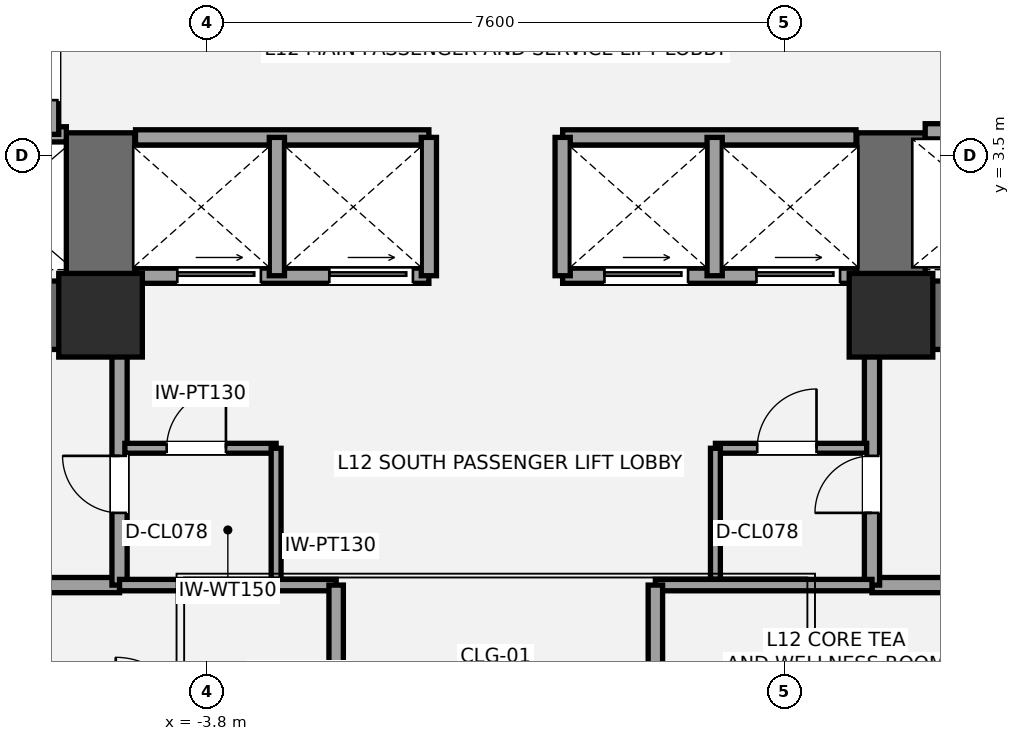
"""IFC4 building model, lengths in metres.
Left out: names, types, materials, properties, quantities, classifications, styles, units other than length and angle.
Written with IfcOpenShell. Run it as: python <this file> out.ifc"""

import sys

from ifc_helpers import new_model, si_unit, direction, frame, frame_2d, origin, origin_2d, place, context, subcontext, project, spatial, rectangle, extrude, element, fill, save


model = new_model("IFC4")
c1 = context("Model", 3, precision=1e-05, world=origin(), true_north=direction((0.0, 1.0)))
c2 = subcontext(c1, "Body", "Model", "MODEL_VIEW")
j1 = project(units=[si_unit("LENGTHUNIT", "METRE"), si_unit("PLANEANGLEUNIT", "RADIAN")], contexts=[c1])
p1 = place(None, origin())
s1 = spatial("IfcSite", under=j1, at=p1, CompositionType="ELEMENT")
p2 = place(p1, origin())
s2 = spatial("IfcBuilding", under=s1, at=p2, CompositionType="ELEMENT")
p3 = place(p2, frame((0.0, 0.0, 48.6)))
s3 = spatial("IfcBuildingStorey", under=s2, at=p3, CompositionType="ELEMENT", Elevation=48.6)
p4 = place(p3, frame((-4.75, 1.4, 0.0), z_axis=(0.0, 0.0, 1.0), x_axis=(-1.0, 0.0, 0.0)))
e1 = element("IfcWall", 1, at=p4, inside=s3, PredefinedType="SHEAR", context=c2, shape_type="SweptSolid", body=[
    extrude(rectangle(XDim=9.3, YDim=0.9, at=frame_2d((4.65, 0.0))), origin(), (0.0, 0.0, 1.0), 3.6),
])
p5 = place(p4, frame((5.55, 0.0, 0.0)))
e2 = element("IfcOpeningElement", 2, at=p5, cuts=e1, PredefinedType="OPENING", context=c2, shape_type="SweptSolid", body=[
    extrude(rectangle(XDim=1.05, YDim=2.15, at=frame_2d((0.525, 1.075))), frame((0.0, 0.46, 0.0), z_axis=(0.0, -1.0, 0.0), x_axis=(1.0, 0.0, 0.0)), (0.0, 0.0, 1.0), 0.92),
])
p6 = place(p4, frame((3.88, 0.0, 0.0)))
e3 = element("IfcOpeningElement", 3, at=p6, cuts=e1, PredefinedType="OPENING", context=c2, shape_type="SweptSolid", body=[
    extrude(rectangle(XDim=1.1, YDim=2.2, at=frame_2d((0.55, 1.1))), frame((0.0, 0.46, 0.0), z_axis=(0.0, -1.0, 0.0), x_axis=(1.0, 0.0, 0.0)), (0.0, 0.0, 1.0), 0.92),
])
p7 = place(p3, frame((-5.2, 0.95, 0.0), z_axis=(0.0, 0.0, 1.0), x_axis=(0.0, 1.0, 0.0)))
e4 = element("IfcWall", 4, at=p7, inside=s3, PredefinedType="SHEAR", context=c2, shape_type="SweptSolid", body=[
    extrude(rectangle(XDim=2.85, YDim=0.9, at=frame_2d((1.425, 0.0))), origin(), (0.0, 0.0, 1.0), 3.6),
])
p8 = place(p3, frame((14.05, 1.4, 0.0), z_axis=(0.0, 0.0, 1.0), x_axis=(-1.0, 0.0, 0.0)))
e5 = element("IfcWall", 5, at=p8, inside=s3, PredefinedType="SHEAR", context=c2, shape_type="SweptSolid", body=[
    extrude(rectangle(XDim=9.3, YDim=0.9, at=frame_2d((4.65, 0.0))), origin(), (0.0, 0.0, 1.0), 3.6),
])
p9 = place(p8, frame((2.7, 0.0, 0.0)))
e6 = element("IfcOpeningElement", 6, at=p9, cuts=e5, PredefinedType="OPENING", context=c2, shape_type="SweptSolid", body=[
    extrude(rectangle(XDim=1.05, YDim=2.15, at=frame_2d((0.525, 1.075))), frame((0.0, 0.46, 0.0), z_axis=(0.0, -1.0, 0.0), x_axis=(1.0, 0.0, 0.0)), (0.0, 0.0, 1.0), 0.92),
])
p10 = place(p8, frame((4.7, 0.0, 0.0)))
e7 = element("IfcOpeningElement", 7, at=p10, cuts=e5, PredefinedType="OPENING", context=c2, shape_type="SweptSolid", body=[
    extrude(rectangle(XDim=1.1, YDim=2.2, at=frame_2d((0.55, 1.1))), frame((0.0, 0.46, 0.0), z_axis=(0.0, -1.0, 0.0), x_axis=(1.0, 0.0, 0.0)), (0.0, 0.0, 1.0), 0.92),
])
p11 = place(p3, frame((5.2, 0.95, 0.0), z_axis=(0.0, 0.0, 1.0), x_axis=(0.0, 1.0, 0.0)))
e8 = element("IfcWall", 8, at=p11, inside=s3, PredefinedType="SHEAR", context=c2, shape_type="SweptSolid", body=[
    extrude(rectangle(XDim=2.85, YDim=0.9, at=frame_2d((1.425, 0.0))), origin(), (0.0, 0.0, 1.0), 3.6),
])
for number, where, z_axis, x_axis in (
    (9, (-5.2, 1.4, 0.0), (0.0, 0.0, 1.0), (1.0, 0.0, 0.0)),
    (10, (5.2, 1.4, 0.0), (0.0, 0.0, 1.0), (1.0, 0.0, 0.0)),
):
    element("IfcColumn", number, at=place(p3, frame(where, z_axis=z_axis, x_axis=x_axis)), inside=s3, PredefinedType="COLUMN", context=c2, shape_type="SweptSolid", body=[
        extrude(rectangle(XDim=1.1, YDim=1.1, at=origin_2d()), origin(), (0.0, 0.0, 1.0), 3.6),
    ])
p12 = place(p3, frame((-7.2, -2.15, 0.0), z_axis=(0.0, 0.0, 1.0), x_axis=(1.0, 0.0, 0.0)))
e11 = element("IfcWall", 11, at=p12, inside=s3, PredefinedType="SOLIDWALL", context=c2, shape_type="SweptSolid", body=[
    extrude(rectangle(XDim=2.25, YDim=0.2, at=frame_2d((1.125, 0.0))), origin(), (0.0, 0.0, 1.0), 3.4),
])
p13 = place(p3, frame((-4.95, -2.15, 0.0), z_axis=(0.0, 0.0, 1.0), x_axis=(0.0, 1.0, 0.0)))
e12 = element("IfcWall", 12, at=p13, inside=s3, PredefinedType="SOLIDWALL", context=c2, shape_type="SweptSolid", body=[
    extrude(rectangle(XDim=3.15, YDim=0.2, at=frame_2d((1.575, 0.0))), origin(), (0.0, 0.0, 1.0), 2.853),
])
p14 = place(p13, frame((0.95, 0.0, 0.0)))
e13 = element("IfcOpeningElement", 13, at=p14, cuts=e12, PredefinedType="OPENING", context=c2, shape_type="SweptSolid", body=[
    extrude(rectangle(XDim=0.75, YDim=2.1, at=frame_2d((0.375, 1.05))), frame((0.0, 0.11, 0.0), z_axis=(0.0, -1.0, 0.0), x_axis=(1.0, 0.0, 0.0)), (0.0, 0.0, 1.0), 0.22),
])
p15 = place(p3, frame((4.95, -2.15, 0.0), z_axis=(0.0, 0.0, 1.0), x_axis=(1.0, 0.0, 0.0)))
e14 = element("IfcWall", 14, at=p15, inside=s3, PredefinedType="SOLIDWALL", context=c2, shape_type="SweptSolid", body=[
    extrude(rectangle(XDim=2.25, YDim=0.2, at=frame_2d((1.125, 0.0))), origin(), (0.0, 0.0, 1.0), 3.4),
])
p16 = place(p3, frame((4.95, -2.15, 0.0), z_axis=(0.0, 0.0, 1.0), x_axis=(0.0, 1.0, 0.0)))
e15 = element("IfcWall", 15, at=p16, inside=s3, PredefinedType="SOLIDWALL", context=c2, shape_type="SweptSolid", body=[
    extrude(rectangle(XDim=3.15, YDim=0.2, at=frame_2d((1.575, 0.0))), origin(), (0.0, 0.0, 1.0), 3.4),
])
p17 = place(p16, frame((0.95, 0.0, 0.0)))
e16 = element("IfcOpeningElement", 16, at=p17, cuts=e15, PredefinedType="OPENING", context=c2, shape_type="SweptSolid", body=[
    extrude(rectangle(XDim=0.75, YDim=2.1, at=frame_2d((0.375, 1.05))), frame((0.0, 0.11, 0.0), z_axis=(0.0, -1.0, 0.0), x_axis=(1.0, 0.0, 0.0)), (0.0, 0.0, 1.0), 0.22),
])
p18 = place(p3, frame((-4.88, -0.35, 0.0), z_axis=(0.0, 0.0, 1.0), x_axis=(1.0, 0.0, 0.0)))
e17 = element("IfcWall", 17, at=p18, inside=s3, PredefinedType="PARTITIONING", context=c2, shape_type="SweptSolid", body=[
    extrude(rectangle(XDim=1.99, YDim=0.13, at=frame_2d((0.995, 0.0))), origin(), (0.0, 0.0, 1.0), 3.4),
])
p19 = place(p18, frame((0.55, 0.0, 0.0)))
e18 = element("IfcOpeningElement", 18, at=p19, cuts=e17, PredefinedType="OPENING", context=c2, shape_type="SweptSolid", body=[
    extrude(rectangle(XDim=0.78, YDim=2.1, at=frame_2d((0.39, 1.05))), frame((0.0, 0.075, 0.0), z_axis=(0.0, -1.0, 0.0), x_axis=(1.0, 0.0, 0.0)), (0.0, 0.0, 1.0), 0.15),
])
p20 = place(p3, frame((-2.89, -2.15, 0.0), z_axis=(0.0, 0.0, 1.0), x_axis=(0.0, 1.0, 0.0)))
e19 = element("IfcWall", 19, at=p20, inside=s3, PredefinedType="PARTITIONING", context=c2, shape_type="SweptSolid", body=[
    extrude(rectangle(XDim=1.8, YDim=0.13, at=frame_2d((0.9, 0.0))), origin(), (0.0, 0.0, 1.0), 3.4),
])
p21 = place(p3, frame((2.89, -0.35, 0.0), z_axis=(0.0, 0.0, 1.0), x_axis=(1.0, 0.0, 0.0)))
e20 = element("IfcWall", 20, at=p21, inside=s3, PredefinedType="PARTITIONING", context=c2, shape_type="SweptSolid", body=[
    extrude(rectangle(XDim=1.99, YDim=0.13, at=frame_2d((0.995, 0.0))), origin(), (0.0, 0.0, 1.0), 3.4),
])
p22 = place(p21, frame((0.55, 0.0, 0.0)))
e21 = element("IfcOpeningElement", 21, at=p22, cuts=e20, PredefinedType="OPENING", context=c2, shape_type="SweptSolid", body=[
    extrude(rectangle(XDim=0.78, YDim=2.1, at=frame_2d((0.39, 1.05))), frame((0.0, 0.075, 0.0), z_axis=(0.0, -1.0, 0.0), x_axis=(1.0, 0.0, 0.0)), (0.0, 0.0, 1.0), 0.15),
])
p23 = place(p3, frame((2.89, -2.15, 0.0), z_axis=(0.0, 0.0, 1.0), x_axis=(0.0, 1.0, 0.0)))
e22 = element("IfcWall", 22, at=p23, inside=s3, PredefinedType="PARTITIONING", context=c2, shape_type="SweptSolid", body=[
    extrude(rectangle(XDim=1.8, YDim=0.13, at=frame_2d((0.9, 0.0))), origin(), (0.0, 0.0, 1.0), 3.4),
])
p24 = place(p3, frame((-9.78, 3.78, 0.0), z_axis=(0.0, 0.0, 1.0), x_axis=(1.0, 0.0, 0.0)))
e23 = element("IfcWall", 23, at=p24, inside=s3, PredefinedType="SOLIDWALL", context=c2, shape_type="SweptSolid", body=[
    extrude(rectangle(XDim=4.13, YDim=0.2, at=frame_2d((2.065, 0.0))), origin(), (0.0, 0.0, 1.0), 3.4),
])
p25 = place(p3, frame((-5.85, 3.78, 0.0), z_axis=(0.0, 0.0, 1.0), x_axis=(0.0, 1.0, 0.0)))
e24 = element("IfcWall", 24, at=p25, inside=s3, PredefinedType="SOLIDWALL", context=c2, shape_type="SweptSolid", body=[
    extrude(rectangle(XDim=1.69, YDim=0.2, at=frame_2d((0.845, 0.0))), origin(), (0.0, 0.0, 1.0), 3.4),
])
p26 = place(p25, frame((0.45, 0.0, 0.0)))
e25 = element("IfcOpeningElement", 25, at=p26, cuts=e24, PredefinedType="OPENING", context=c2, shape_type="SweptSolid", body=[
    extrude(rectangle(XDim=0.75, YDim=2.1, at=frame_2d((0.375, 1.05))), frame((0.0, 0.11, 0.0), z_axis=(0.0, -1.0, 0.0), x_axis=(1.0, 0.0, 0.0)), (0.0, 0.0, 1.0), 0.22),
])
p27 = place(p3, frame((5.65, 3.82, 0.0), z_axis=(0.0, 0.0, 1.0), x_axis=(1.0, 0.0, 0.0)))
e26 = element("IfcWall", 26, at=p27, inside=s3, PredefinedType="SOLIDWALL", context=c2, shape_type="SweptSolid", body=[
    extrude(rectangle(XDim=4.13, YDim=0.2, at=frame_2d((2.065, 0.0))), origin(), (0.0, 0.0, 1.0), 3.4),
])
p28 = place(p27, frame((0.65, 0.0, 0.0)))
e27 = element("IfcOpeningElement", 27, at=p28, cuts=e26, PredefinedType="OPENING", context=c2, shape_type="SweptSolid", body=[
    extrude(rectangle(XDim=1.2, YDim=2.2, at=frame_2d((0.6, 1.1))), frame((0.0, 0.11, 0.0), z_axis=(0.0, -1.0, 0.0), x_axis=(1.0, 0.0, 0.0)), (0.0, 0.0, 1.0), 0.22),
])
p29 = place(p3, frame((-4.74, 1.92, 0.0), z_axis=(0.0, 0.0, 1.0), x_axis=(1.0, 0.0, 0.0)))
e28 = element("IfcWall", 28, at=p29, inside=s3, PredefinedType="SOLIDWALL", context=c2, shape_type="SweptSolid", body=[
    extrude(rectangle(XDim=3.86, YDim=0.2, at=frame_2d((1.93, 0.0))), origin(), (0.0, 0.0, 1.0), 2.39),
])
p30 = place(p29, frame((0.55, 0.0, 0.0)))
e29 = element("IfcOpeningElement", 29, at=p30, cuts=e28, PredefinedType="OPENING", context=c2, shape_type="SweptSolid", body=[
    extrude(rectangle(XDim=1.1, YDim=2.2, at=frame_2d((0.55, 1.1))), frame((0.0, 0.11, 0.0), z_axis=(0.0, -1.0, 0.0), x_axis=(1.0, 0.0, 0.0)), (0.0, 0.0, 1.0), 0.22),
])
p31 = place(p29, frame((2.55, 0.0, 0.0)))
e30 = element("IfcOpeningElement", 30, at=p31, cuts=e28, PredefinedType="OPENING", context=c2, shape_type="SweptSolid", body=[
    extrude(rectangle(XDim=1.1, YDim=2.2, at=frame_2d((0.55, 1.1))), frame((0.0, 0.11, 0.0), z_axis=(0.0, -1.0, 0.0), x_axis=(1.0, 0.0, 0.0)), (0.0, 0.0, 1.0), 0.22),
])
p32 = place(p3, frame((0.88, 1.92, 0.0), z_axis=(0.0, 0.0, 1.0), x_axis=(1.0, 0.0, 0.0)))
e31 = element("IfcWall", 31, at=p32, inside=s3, PredefinedType="SOLIDWALL", context=c2, shape_type="SweptSolid", body=[
    extrude(rectangle(XDim=3.86, YDim=0.2, at=frame_2d((1.93, 0.0))), origin(), (0.0, 0.0, 1.0), 2.39),
])
p33 = place(p32, frame((0.55, 0.0, 0.0)))
e32 = element("IfcOpeningElement", 32, at=p33, cuts=e31, PredefinedType="OPENING", context=c2, shape_type="SweptSolid", body=[
    extrude(rectangle(XDim=1.1, YDim=2.2, at=frame_2d((0.55, 1.1))), frame((0.0, 0.11, 0.0), z_axis=(0.0, -1.0, 0.0), x_axis=(1.0, 0.0, 0.0)), (0.0, 0.0, 1.0), 0.22),
])
p34 = place(p32, frame((2.55, 0.0, 0.0)))
e33 = element("IfcOpeningElement", 33, at=p34, cuts=e31, PredefinedType="OPENING", context=c2, shape_type="SweptSolid", body=[
    extrude(rectangle(XDim=1.1, YDim=2.2, at=frame_2d((0.55, 1.1))), frame((0.0, 0.11, 0.0), z_axis=(0.0, -1.0, 0.0), x_axis=(1.0, 0.0, 0.0)), (0.0, 0.0, 1.0), 0.22),
])
for number, where, z_axis, x_axis in (
    (34, (-4.74, 3.74, 0.0), (0.0, 0.0, 1.0), (1.0, 0.0, 0.0)),
    (35, (0.88, 3.74, 0.0), (0.0, 0.0, 1.0), (1.0, 0.0, 0.0)),
):
    element("IfcWall", number, at=place(p3, frame(where, z_axis=z_axis, x_axis=x_axis)), inside=s3, PredefinedType="SOLIDWALL", context=c2, shape_type="SweptSolid", body=[
        extrude(rectangle(XDim=3.86, YDim=0.2, at=frame_2d((1.93, 0.0))), origin(), (0.0, 0.0, 1.0), 3.4),
    ])
for number, where, z_axis, x_axis in (
    (36, (-2.88, 1.92, 0.0), (0.0, 0.0, 1.0), (0.0, 1.0, 0.0)),
    (37, (2.88, 1.92, 0.0), (0.0, 0.0, 1.0), (0.0, 1.0, 0.0)),
    (38, (-0.88, 1.92, 0.0), (0.0, 0.0, 1.0), (0.0, 1.0, 0.0)),
    (39, (0.88, 1.92, 0.0), (0.0, 0.0, 1.0), (0.0, 1.0, 0.0)),
):
    element("IfcWall", number, at=place(p3, frame(where, z_axis=z_axis, x_axis=x_axis)), inside=s3, PredefinedType="SOLIDWALL", context=c2, shape_type="SweptSolid", body=[
        extrude(rectangle(XDim=1.82, YDim=0.2, at=frame_2d((0.91, 0.0))), origin(), (0.0, 0.0, 1.0), 3.4),
    ])
p35 = place(p3, frame((-4.95, -2.15, 0.0), z_axis=(0.0, 0.0, 1.0), x_axis=(1.0, 0.0, 0.0)))
e40 = element("IfcWall", 40, at=p35, inside=s3, PredefinedType="PLUMBINGWALL", context=c2, shape_type="SweptSolid", body=[
    extrude(rectangle(XDim=2.85, YDim=0.15, at=frame_2d((1.425, 0.0))), origin(), (0.0, 0.0, 1.0), 2.853),
])
p36 = place(p3, frame((-2.1, -4.05, 0.0), z_axis=(0.0, 0.0, 1.0), x_axis=(0.0, 1.0, 0.0)))
e41 = element("IfcWall", 41, at=p36, inside=s3, PredefinedType="PLUMBINGWALL", context=c2, shape_type="SweptSolid", body=[
    extrude(rectangle(XDim=1.9, YDim=0.19, at=frame_2d((0.95, 0.0))), origin(), (0.0, 0.0, 1.0), 3.4),
])
p37 = place(p3, frame((2.1, -2.15, 0.0), z_axis=(0.0, 0.0, 1.0), x_axis=(1.0, 0.0, 0.0)))
e42 = element("IfcWall", 42, at=p37, inside=s3, PredefinedType="PLUMBINGWALL", context=c2, shape_type="SweptSolid", body=[
    extrude(rectangle(XDim=2.85, YDim=0.15, at=frame_2d((1.425, 0.0))), origin(), (0.0, 0.0, 1.0), 3.4),
])
p38 = place(p3, frame((2.1, -4.05, 0.0), z_axis=(0.0, 0.0, 1.0), x_axis=(0.0, 1.0, 0.0)))
e43 = element("IfcWall", 43, at=p38, inside=s3, PredefinedType="PLUMBINGWALL", context=c2, shape_type="SweptSolid", body=[
    extrude(rectangle(XDim=1.9, YDim=0.19, at=frame_2d((0.95, 0.0))), origin(), (0.0, 0.0, 1.0), 3.4),
])
p39 = place(p14, origin())
e44 = element("IfcDoor", 44, at=p39, inside=s3, OperationType="SINGLE_SWING_RIGHT", PredefinedType="DOOR", context=c2, shape_type="SweptSolid", body=[
    extrude(rectangle(XDim=0.75, YDim=2.1, at=frame_2d((0.375, 1.05))), frame((0.0, 0.025, 0.0), z_axis=(0.0, -1.0, 0.0), x_axis=(1.0, 0.0, 0.0)), (0.0, 0.0, 1.0), 0.05),
])
fill(e13, e44)
p40 = place(p17, origin())
e45 = element("IfcDoor", 45, at=p40, inside=s3, OperationType="SINGLE_SWING_LEFT", PredefinedType="DOOR", context=c2, shape_type="SweptSolid", body=[
    extrude(rectangle(XDim=0.75, YDim=2.1, at=frame_2d((0.375, 1.05))), frame((0.0, 0.025, 0.0), z_axis=(0.0, -1.0, 0.0), x_axis=(1.0, 0.0, 0.0)), (0.0, 0.0, 1.0), 0.05),
])
fill(e16, e45)
p41 = place(p19, origin())
e46 = element("IfcDoor", 46, at=p41, inside=s3, OperationType="SINGLE_SWING_RIGHT", PredefinedType="DOOR", context=c2, shape_type="SweptSolid", body=[
    extrude(rectangle(XDim=0.78, YDim=2.1, at=frame_2d((0.39, 1.05))), frame((0.0, 0.025, 0.0), z_axis=(0.0, -1.0, 0.0), x_axis=(1.0, 0.0, 0.0)), (0.0, 0.0, 1.0), 0.05),
])
fill(e18, e46)
p42 = place(p22, origin())
e47 = element("IfcDoor", 47, at=p42, inside=s3, OperationType="SINGLE_SWING_RIGHT", PredefinedType="DOOR", context=c2, shape_type="SweptSolid", body=[
    extrude(rectangle(XDim=0.78, YDim=2.1, at=frame_2d((0.39, 1.05))), frame((0.0, 0.025, 0.0), z_axis=(0.0, -1.0, 0.0), x_axis=(1.0, 0.0, 0.0)), (0.0, 0.0, 1.0), 0.05),
])
fill(e21, e47)
p43 = place(p26, origin())
e48 = element("IfcDoor", 48, at=p43, inside=s3, OperationType="SINGLE_SWING_RIGHT", PredefinedType="DOOR", context=c2, shape_type="SweptSolid", body=[
    extrude(rectangle(XDim=0.75, YDim=2.1, at=frame_2d((0.375, 1.05))), frame((0.0, 0.025, 0.0), z_axis=(0.0, -1.0, 0.0), x_axis=(1.0, 0.0, 0.0)), (0.0, 0.0, 1.0), 0.05),
])
fill(e25, e48)
p44 = place(p30, origin())
e49 = element("IfcDoor", 49, at=p44, inside=s3, OperationType="SLIDING_TO_LEFT", PredefinedType="DOOR", context=c2, shape_type="SweptSolid", body=[
    extrude(rectangle(XDim=1.1, YDim=2.2, at=frame_2d((0.55, 1.1))), frame((0.0, 0.025, 0.0), z_axis=(0.0, -1.0, 0.0), x_axis=(1.0, 0.0, 0.0)), (0.0, 0.0, 1.0), 0.05),
])
fill(e29, e49)
p45 = place(p31, origin())
e50 = element("IfcDoor", 50, at=p45, inside=s3, OperationType="SLIDING_TO_LEFT", PredefinedType="DOOR", context=c2, shape_type="SweptSolid", body=[
    extrude(rectangle(XDim=1.1, YDim=2.2, at=frame_2d((0.55, 1.1))), frame((0.0, 0.025, 0.0), z_axis=(0.0, -1.0, 0.0), x_axis=(1.0, 0.0, 0.0)), (0.0, 0.0, 1.0), 0.05),
])
fill(e30, e50)
p46 = place(p33, origin())
e51 = element("IfcDoor", 51, at=p46, inside=s3, OperationType="SLIDING_TO_LEFT", PredefinedType="DOOR", context=c2, shape_type="SweptSolid", body=[
    extrude(rectangle(XDim=1.1, YDim=2.2, at=frame_2d((0.55, 1.1))), frame((0.0, 0.025, 0.0), z_axis=(0.0, -1.0, 0.0), x_axis=(1.0, 0.0, 0.0)), (0.0, 0.0, 1.0), 0.05),
])
fill(e32, e51)
p47 = place(p34, origin())
e52 = element("IfcDoor", 52, at=p47, inside=s3, OperationType="SLIDING_TO_LEFT", PredefinedType="DOOR", context=c2, shape_type="SweptSolid", body=[
    extrude(rectangle(XDim=1.1, YDim=2.2, at=frame_2d((0.55, 1.1))), frame((0.0, 0.025, 0.0), z_axis=(0.0, -1.0, 0.0), x_axis=(1.0, 0.0, 0.0)), (0.0, 0.0, 1.0), 0.05),
])
fill(e33, e52)
save(model, sys.argv[1])
